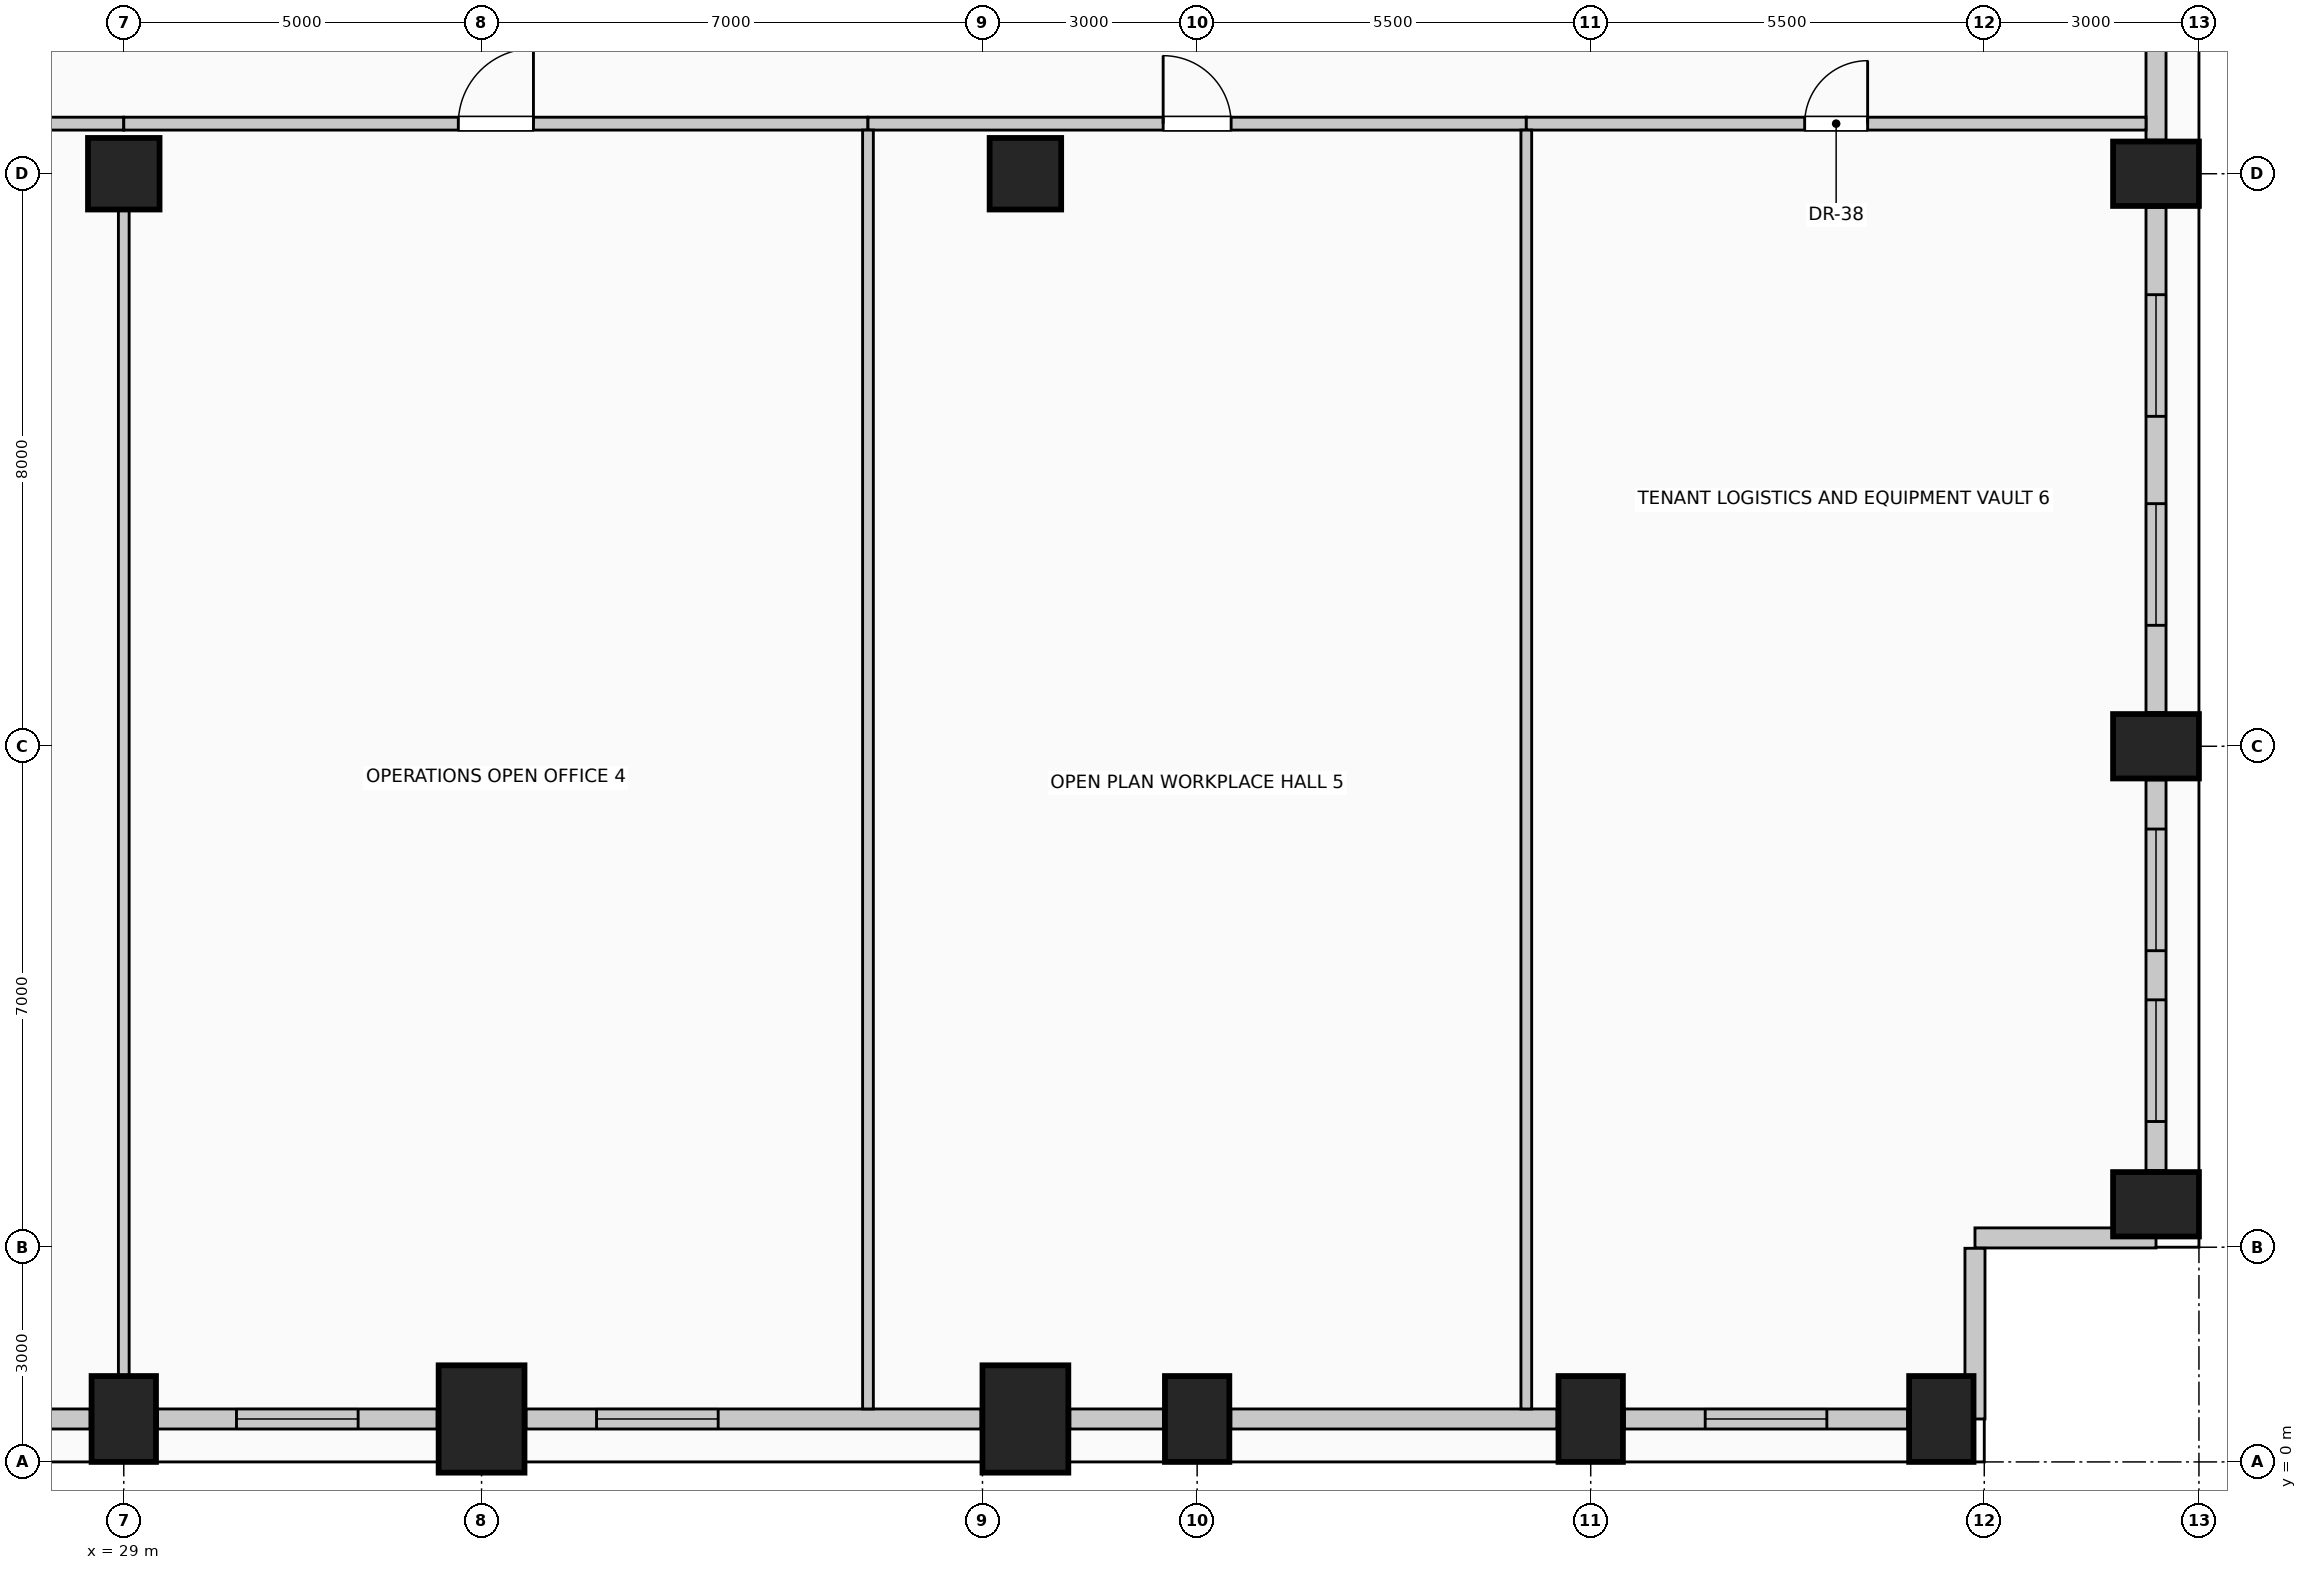
"""IFC4 building model, lengths in metres.
Left out: names, types, materials, properties, quantities, classifications, styles, units other than length and angle.
Written with IfcOpenShell. Run it as: python <this file> out.ifc"""

import sys

from ifc_helpers import new_model, si_unit, direction, frame, frame_2d, origin, origin_2d, place, context, subcontext, project, spatial, rectangle, circle, extrude, element, fill, save


model = new_model("IFC4")
c1 = context("Model", 3, precision=1e-05, world=origin(), true_north=direction((0.0, 1.0)))
c2 = subcontext(c1, "Body", "Model", "MODEL_VIEW")
j1 = project(units=[si_unit("LENGTHUNIT", "METRE"), si_unit("PLANEANGLEUNIT", "RADIAN")], contexts=[c1])
p1 = place(None, origin())
s1 = spatial("IfcSite", under=j1, at=p1, CompositionType="ELEMENT")
p2 = place(p1, origin())
s2 = spatial("IfcBuilding", under=s1, at=p2, CompositionType="ELEMENT")
p3 = place(p2, frame((0.0, 0.0, 78.6)))
s3 = spatial("IfcBuildingStorey", under=s2, at=p3, CompositionType="ELEMENT", Elevation=78.6)
p4 = place(p3, frame((29.0, 0.6, 0.0), z_axis=(0.0, 0.0, 1.0), x_axis=(1.0, 0.0, 0.0)))
e1 = element("IfcColumn", 1, at=p4, inside=s3, PredefinedType="COLUMN", context=c2, shape_type="SweptSolid", body=[
    extrude(rectangle(XDim=0.9, YDim=1.2, at=origin_2d()), origin(), (0.0, 0.0, 1.0), 4.0),
])
for number, where, z_axis, x_axis in (
    (2, (34.0, 0.6, 0.0), (0.0, 0.0, 1.0), (1.0, 0.0, 0.0)),
    (3, (41.6, 0.6, 0.0), (0.0, 0.0, 1.0), (1.0, 0.0, 0.0)),
):
    element("IfcColumn", number, at=place(p3, frame(where, z_axis=z_axis, x_axis=x_axis)), inside=s3, PredefinedType="COLUMN", context=c2, shape_type="SweptSolid", body=[
        extrude(rectangle(XDim=1.2, YDim=1.5, at=origin_2d()), origin(), (0.0, 0.0, 1.0), 4.0),
    ])
for number, where, z_axis, x_axis in (
    (4, (44.0, 0.6, 0.0), (0.0, 0.0, 1.0), (1.0, 0.0, 0.0)),
    (5, (49.5, 0.6, 0.0), (0.0, 0.0, 1.0), (1.0, 0.0, 0.0)),
    (6, (54.4, 0.6, 0.0), (0.0, 0.0, 1.0), (1.0, 0.0, 0.0)),
    (7, (57.4, 3.6, 0.0), (0.0, 0.0, 1.0), (0.0, 1.0, 0.0)),
    (8, (57.4, 10.0, 0.0), (0.0, 0.0, 1.0), (0.0, 1.0, 0.0)),
    (9, (57.4, 18.0, 0.0), (0.0, 0.0, 1.0), (0.0, 1.0, 0.0)),
):
    element("IfcColumn", number, at=place(p3, frame(where, z_axis=z_axis, x_axis=x_axis)), inside=s3, PredefinedType="COLUMN", context=c2, shape_type="SweptSolid", body=[
        extrude(rectangle(XDim=0.9, YDim=1.2, at=origin_2d()), origin(), (0.0, 0.0, 1.0), 4.0),
    ])
for number, where, z_axis, x_axis in (
    (10, (29.0, 18.0, 0.0), (0.0, 0.0, 1.0), (1.0, 0.0, 0.0)),
    (11, (41.6, 18.0, 0.0), (0.0, 0.0, 1.0), (1.0, 0.0, 0.0)),
):
    element("IfcColumn", number, at=place(p3, frame(where, z_axis=z_axis, x_axis=x_axis)), inside=s3, PredefinedType="COLUMN", context=c2, shape_type="SweptSolid", body=[
        extrude(circle(Radius=0.5, at=origin_2d()), origin(), (0.0, 0.0, 1.0), 4.0),
    ])
p5 = place(p3, frame((28.53, 0.6, 0.0), z_axis=(0.0, 0.0, 1.0), x_axis=(-1.0, 0.0, 0.0)))
e12 = element("IfcWall", 12, at=p5, inside=s3, PredefinedType="SOLIDWALL", context=c2, shape_type="SweptSolid", body=[
    extrude(rectangle(XDim=3.91, YDim=0.28, at=frame_2d((1.955, 0.0))), origin(), (0.0, 0.0, 1.0), 2.81),
])
p6 = place(p5, frame((1.105, 0.0, 0.5)))
e13 = element("IfcOpeningElement", 13, at=p6, cuts=e12, PredefinedType="OPENING", context=c2, shape_type="SweptSolid", body=[
    extrude(rectangle(XDim=1.7, YDim=1.95, at=frame_2d((0.85, 0.975))), frame((0.0, 0.15, 0.0), z_axis=(0.0, -1.0, 0.0), x_axis=(1.0, 0.0, 0.0)), (0.0, 0.0, 1.0), 0.3),
])
p7 = place(p3, frame((33.38, 0.6, 0.0), z_axis=(0.0, 0.0, 1.0), x_axis=(-1.0, 0.0, 0.0)))
e14 = element("IfcWall", 14, at=p7, inside=s3, PredefinedType="SOLIDWALL", context=c2, shape_type="SweptSolid", body=[
    extrude(rectangle(XDim=3.91, YDim=0.28, at=frame_2d((1.955, 0.0))), origin(), (0.0, 0.0, 1.0), 2.81),
])
p8 = place(p7, frame((1.105, 0.0, 0.5)))
e15 = element("IfcOpeningElement", 15, at=p8, cuts=e14, PredefinedType="OPENING", context=c2, shape_type="SweptSolid", body=[
    extrude(rectangle(XDim=1.7, YDim=1.95, at=frame_2d((0.85, 0.975))), frame((0.0, 0.15, 0.0), z_axis=(0.0, -1.0, 0.0), x_axis=(1.0, 0.0, 0.0)), (0.0, 0.0, 1.0), 0.3),
])
p9 = place(p3, frame((40.98, 0.6, 0.0), z_axis=(0.0, 0.0, 1.0), x_axis=(-1.0, 0.0, 0.0)))
e16 = element("IfcWall", 16, at=p9, inside=s3, PredefinedType="SOLIDWALL", context=c2, shape_type="SweptSolid", body=[
    extrude(rectangle(XDim=6.36, YDim=0.28, at=frame_2d((3.18, 0.0))), origin(), (0.0, 0.0, 1.0), 2.81),
])
p10 = place(p9, frame((3.673, 0.0, 0.5)))
e17 = element("IfcOpeningElement", 17, at=p10, cuts=e16, PredefinedType="OPENING", context=c2, shape_type="SweptSolid", body=[
    extrude(rectangle(XDim=1.7, YDim=1.95, at=frame_2d((0.85, 0.975))), frame((0.0, 0.15, 0.0), z_axis=(0.0, -1.0, 0.0), x_axis=(1.0, 0.0, 0.0)), (0.0, 0.0, 1.0), 0.3),
])
p11 = place(p3, frame((43.53, 0.6, 0.0), z_axis=(0.0, 0.0, 1.0), x_axis=(-1.0, 0.0, 0.0)))
e18 = element("IfcWall", 18, at=p11, inside=s3, PredefinedType="SOLIDWALL", context=c2, shape_type="SweptSolid", body=[
    extrude(rectangle(XDim=1.31, YDim=0.28, at=frame_2d((0.655, 0.0))), origin(), (0.0, 0.0, 1.0), 2.81),
])
p12 = place(p3, frame((49.03, 0.6, 0.0), z_axis=(0.0, 0.0, 1.0), x_axis=(-1.0, 0.0, 0.0)))
e19 = element("IfcWall", 19, at=p12, inside=s3, PredefinedType="SOLIDWALL", context=c2, shape_type="SweptSolid", body=[
    extrude(rectangle(XDim=4.56, YDim=0.28, at=frame_2d((2.28, 0.0))), origin(), (0.0, 0.0, 1.0), 2.81),
])
p13 = place(p3, frame((53.93, 0.6, 0.0), z_axis=(0.0, 0.0, 1.0), x_axis=(-1.0, 0.0, 0.0)))
e20 = element("IfcWall", 20, at=p13, inside=s3, PredefinedType="SOLIDWALL", context=c2, shape_type="SweptSolid", body=[
    extrude(rectangle(XDim=3.96, YDim=0.28, at=frame_2d((1.98, 0.0))), origin(), (0.0, 0.0, 1.0), 2.81),
])
p14 = place(p13, frame((1.13, 0.0, 0.5)))
e21 = element("IfcOpeningElement", 21, at=p14, cuts=e20, PredefinedType="OPENING", context=c2, shape_type="SweptSolid", body=[
    extrude(rectangle(XDim=1.7, YDim=1.95, at=frame_2d((0.85, 0.975))), frame((0.0, 0.15, 0.0), z_axis=(0.0, -1.0, 0.0), x_axis=(1.0, 0.0, 0.0)), (0.0, 0.0, 1.0), 0.3),
])
p15 = place(p3, frame((57.4, 9.53, 0.0), z_axis=(0.0, 0.0, 1.0), x_axis=(0.0, -1.0, 0.0)))
e22 = element("IfcWall", 22, at=p15, inside=s3, PredefinedType="SOLIDWALL", context=c2, shape_type="SweptSolid", body=[
    extrude(rectangle(XDim=5.46, YDim=0.28, at=frame_2d((2.73, 0.0))), origin(), (0.0, 0.0, 1.0), 2.81),
])
p16 = place(p15, frame((0.687, 0.0, 0.5)))
e23 = element("IfcOpeningElement", 23, at=p16, cuts=e22, PredefinedType="OPENING", context=c2, shape_type="SweptSolid", body=[
    extrude(rectangle(XDim=1.7, YDim=1.95, at=frame_2d((0.85, 0.975))), frame((0.0, 0.15, 0.0), z_axis=(0.0, -1.0, 0.0), x_axis=(1.0, 0.0, 0.0)), (0.0, 0.0, 1.0), 0.3),
])
p17 = place(p15, frame((3.073, 0.0, 0.5)))
e24 = element("IfcOpeningElement", 24, at=p17, cuts=e22, PredefinedType="OPENING", context=c2, shape_type="SweptSolid", body=[
    extrude(rectangle(XDim=1.7, YDim=1.95, at=frame_2d((0.85, 0.975))), frame((0.0, 0.15, 0.0), z_axis=(0.0, -1.0, 0.0), x_axis=(1.0, 0.0, 0.0)), (0.0, 0.0, 1.0), 0.3),
])
p18 = place(p3, frame((57.4, 17.53, 0.0), z_axis=(0.0, 0.0, 1.0), x_axis=(0.0, -1.0, 0.0)))
e25 = element("IfcWall", 25, at=p18, inside=s3, PredefinedType="SOLIDWALL", context=c2, shape_type="SweptSolid", body=[
    extrude(rectangle(XDim=7.06, YDim=0.28, at=frame_2d((3.53, 0.0))), origin(), (0.0, 0.0, 1.0), 2.81),
])
p19 = place(p18, frame((1.22, 0.0, 0.5)))
e26 = element("IfcOpeningElement", 26, at=p19, cuts=e25, PredefinedType="OPENING", context=c2, shape_type="SweptSolid", body=[
    extrude(rectangle(XDim=1.7, YDim=1.95, at=frame_2d((0.85, 0.975))), frame((0.0, 0.15, 0.0), z_axis=(0.0, -1.0, 0.0), x_axis=(1.0, 0.0, 0.0)), (0.0, 0.0, 1.0), 0.3),
])
p20 = place(p18, frame((4.14, 0.0, 0.5)))
e27 = element("IfcOpeningElement", 27, at=p20, cuts=e25, PredefinedType="OPENING", context=c2, shape_type="SweptSolid", body=[
    extrude(rectangle(XDim=1.7, YDim=1.95, at=frame_2d((0.85, 0.975))), frame((0.0, 0.15, 0.0), z_axis=(0.0, -1.0, 0.0), x_axis=(1.0, 0.0, 0.0)), (0.0, 0.0, 1.0), 0.3),
])
p21 = place(p3, frame((57.4, 25.53, 0.0), z_axis=(0.0, 0.0, 1.0), x_axis=(0.0, -1.0, 0.0)))
e28 = element("IfcWall", 28, at=p21, inside=s3, PredefinedType="SOLIDWALL", context=c2, shape_type="SweptSolid", body=[
    extrude(rectangle(XDim=7.06, YDim=0.28, at=frame_2d((3.53, 0.0))), origin(), (0.0, 0.0, 1.0), 2.81),
])
p22 = place(p3, frame((57.4, 3.13, 0.0), z_axis=(0.0, 0.0, 1.0), x_axis=(-1.0, 0.0, 0.0)))
e29 = element("IfcWall", 29, at=p22, inside=s3, PredefinedType="SOLIDWALL", context=c2, shape_type="SweptSolid", body=[
    extrude(rectangle(XDim=2.53, YDim=0.28, at=frame_2d((1.265, 0.0))), origin(), (0.0, 0.0, 1.0), 3.66),
])
p23 = place(p3, frame((54.87, 2.985, 0.0), z_axis=(0.0, 0.0, 1.0), x_axis=(0.0, -1.0, 0.0)))
e30 = element("IfcWall", 30, at=p23, inside=s3, PredefinedType="SOLIDWALL", context=c2, shape_type="SweptSolid", body=[
    extrude(rectangle(XDim=2.385, YDim=0.28, at=frame_2d((1.192, 0.0))), origin(), (0.0, 0.0, 1.0), 3.66),
])
p24 = place(p3, frame((19.2, 18.7, 0.0), z_axis=(0.0, 0.0, 1.0), x_axis=(1.0, 0.0, 0.0)))
e31 = element("IfcWall", 31, at=p24, inside=s3, PredefinedType="PARTITIONING", context=c2, shape_type="SweptSolid", body=[
    extrude(rectangle(XDim=9.8, YDim=0.18, at=frame_2d((4.9, 0.0))), origin(), (0.0, 0.0, 1.0), 3.66),
])
p25 = place(p24, frame((4.425, 0.0, 0.0)))
e32 = element("IfcOpeningElement", 32, at=p25, cuts=e31, PredefinedType="OPENING", context=c2, shape_type="SweptSolid", body=[
    extrude(rectangle(XDim=0.95, YDim=2.15, at=frame_2d((0.475, 1.075))), frame((0.0, 0.1, 0.0), z_axis=(0.0, -1.0, 0.0), x_axis=(1.0, 0.0, 0.0)), (0.0, 0.0, 1.0), 0.2),
])
p26 = place(p3, frame((29.0, 18.7, 0.0), z_axis=(0.0, 0.0, 1.0), x_axis=(1.0, 0.0, 0.0)))
e33 = element("IfcWall", 33, at=p26, inside=s3, PredefinedType="PARTITIONING", context=c2, shape_type="SweptSolid", body=[
    extrude(rectangle(XDim=10.4, YDim=0.18, at=frame_2d((5.2, 0.0))), origin(), (0.0, 0.0, 1.0), 3.66),
])
p27 = place(p26, frame((4.675, 0.0, 0.0)))
e34 = element("IfcOpeningElement", 34, at=p27, cuts=e33, PredefinedType="OPENING", context=c2, shape_type="SweptSolid", body=[
    extrude(rectangle(XDim=1.05, YDim=2.15, at=frame_2d((0.525, 1.075))), frame((0.0, 0.1, 0.0), z_axis=(0.0, -1.0, 0.0), x_axis=(1.0, 0.0, 0.0)), (0.0, 0.0, 1.0), 0.2),
])
p28 = place(p3, frame((39.4, 18.7, 0.0), z_axis=(0.0, 0.0, 1.0), x_axis=(1.0, 0.0, 0.0)))
e35 = element("IfcWall", 35, at=p28, inside=s3, PredefinedType="PARTITIONING", context=c2, shape_type="SweptSolid", body=[
    extrude(rectangle(XDim=9.2, YDim=0.18, at=frame_2d((4.6, 0.0))), origin(), (0.0, 0.0, 1.0), 3.66),
])
p29 = place(p28, frame((4.125, 0.0, 0.0)))
e36 = element("IfcOpeningElement", 36, at=p29, cuts=e35, PredefinedType="OPENING", context=c2, shape_type="SweptSolid", body=[
    extrude(rectangle(XDim=0.95, YDim=2.15, at=frame_2d((0.475, 1.075))), frame((0.0, 0.1, 0.0), z_axis=(0.0, -1.0, 0.0), x_axis=(1.0, 0.0, 0.0)), (0.0, 0.0, 1.0), 0.2),
])
p30 = place(p3, frame((48.6, 18.7, 0.0), z_axis=(0.0, 0.0, 1.0), x_axis=(1.0, 0.0, 0.0)))
e37 = element("IfcWall", 37, at=p30, inside=s3, PredefinedType="PARTITIONING", context=c2, shape_type="SweptSolid", body=[
    extrude(rectangle(XDim=8.66, YDim=0.18, at=frame_2d((4.33, 0.0))), origin(), (0.0, 0.0, 1.0), 3.66),
])
p31 = place(p30, frame((3.89, 0.0, 0.0)))
e38 = element("IfcOpeningElement", 38, at=p31, cuts=e37, PredefinedType="OPENING", context=c2, shape_type="SweptSolid", body=[
    extrude(rectangle(XDim=0.88, YDim=2.1, at=frame_2d((0.44, 1.05))), frame((0.0, 0.1, 0.0), z_axis=(0.0, -1.0, 0.0), x_axis=(1.0, 0.0, 0.0)), (0.0, 0.0, 1.0), 0.2),
])
p32 = place(p3, frame((29.0, 1.2, 0.0), z_axis=(0.0, 0.0, 1.0), x_axis=(0.0, 1.0, 0.0)))
e39 = element("IfcWall", 39, at=p32, inside=s3, PredefinedType="PARTITIONING", context=c2, shape_type="SweptSolid", body=[
    extrude(rectangle(XDim=16.3, YDim=0.15, at=frame_2d((8.15, 0.0))), origin(), (0.0, 0.0, 1.0), 2.955),
])
for number, where, z_axis, x_axis in (
    (40, (39.4, 0.74, 0.0), (0.0, 0.0, 1.0), (0.0, 1.0, 0.0)),
    (41, (48.6, 0.74, 0.0), (0.0, 0.0, 1.0), (0.0, 1.0, 0.0)),
):
    element("IfcWall", number, at=place(p3, frame(where, z_axis=z_axis, x_axis=x_axis)), inside=s3, PredefinedType="PARTITIONING", context=c2, shape_type="SweptSolid", body=[
        extrude(rectangle(XDim=17.87, YDim=0.15, at=frame_2d((8.935, 0.0))), origin(), (0.0, 0.0, 1.0), 3.66),
    ])
p33 = place(p8, origin())
e42 = element("IfcWindow", 42, at=p33, inside=s3, PartitioningType="SINGLE_PANEL", PredefinedType="WINDOW", context=c2, shape_type="SweptSolid", body=[
    extrude(rectangle(XDim=1.7, YDim=1.95, at=frame_2d((0.85, 0.975))), frame((0.0, 0.03, 0.0), z_axis=(0.0, -1.0, 0.0), x_axis=(1.0, 0.0, 0.0)), (0.0, 0.0, 1.0), 0.06),
])
fill(e15, e42)
p34 = place(p10, origin())
e43 = element("IfcWindow", 43, at=p34, inside=s3, PartitioningType="SINGLE_PANEL", PredefinedType="WINDOW", context=c2, shape_type="SweptSolid", body=[
    extrude(rectangle(XDim=1.7, YDim=1.95, at=frame_2d((0.85, 0.975))), frame((0.0, 0.03, 0.0), z_axis=(0.0, -1.0, 0.0), x_axis=(1.0, 0.0, 0.0)), (0.0, 0.0, 1.0), 0.06),
])
fill(e17, e43)
p35 = place(p14, origin())
e44 = element("IfcWindow", 44, at=p35, inside=s3, PartitioningType="SINGLE_PANEL", PredefinedType="WINDOW", context=c2, shape_type="SweptSolid", body=[
    extrude(rectangle(XDim=1.7, YDim=1.95, at=frame_2d((0.85, 0.975))), frame((0.0, 0.03, 0.0), z_axis=(0.0, -1.0, 0.0), x_axis=(1.0, 0.0, 0.0)), (0.0, 0.0, 1.0), 0.06),
])
fill(e21, e44)
p36 = place(p16, origin())
e45 = element("IfcWindow", 45, at=p36, inside=s3, PartitioningType="SINGLE_PANEL", PredefinedType="WINDOW", context=c2, shape_type="SweptSolid", body=[
    extrude(rectangle(XDim=1.7, YDim=1.95, at=frame_2d((0.85, 0.975))), frame((0.0, 0.03, 0.0), z_axis=(0.0, -1.0, 0.0), x_axis=(1.0, 0.0, 0.0)), (0.0, 0.0, 1.0), 0.06),
])
fill(e23, e45)
p37 = place(p17, origin())
e46 = element("IfcWindow", 46, at=p37, inside=s3, PartitioningType="SINGLE_PANEL", PredefinedType="WINDOW", context=c2, shape_type="SweptSolid", body=[
    extrude(rectangle(XDim=1.7, YDim=1.95, at=frame_2d((0.85, 0.975))), frame((0.0, 0.03, 0.0), z_axis=(0.0, -1.0, 0.0), x_axis=(1.0, 0.0, 0.0)), (0.0, 0.0, 1.0), 0.06),
])
fill(e24, e46)
p38 = place(p19, origin())
e47 = element("IfcWindow", 47, at=p38, inside=s3, PartitioningType="SINGLE_PANEL", PredefinedType="WINDOW", context=c2, shape_type="SweptSolid", body=[
    extrude(rectangle(XDim=1.7, YDim=1.95, at=frame_2d((0.85, 0.975))), frame((0.0, 0.03, 0.0), z_axis=(0.0, -1.0, 0.0), x_axis=(1.0, 0.0, 0.0)), (0.0, 0.0, 1.0), 0.06),
])
fill(e26, e47)
p39 = place(p20, origin())
e48 = element("IfcWindow", 48, at=p39, inside=s3, PartitioningType="SINGLE_PANEL", PredefinedType="WINDOW", context=c2, shape_type="SweptSolid", body=[
    extrude(rectangle(XDim=1.7, YDim=1.95, at=frame_2d((0.85, 0.975))), frame((0.0, 0.03, 0.0), z_axis=(0.0, -1.0, 0.0), x_axis=(1.0, 0.0, 0.0)), (0.0, 0.0, 1.0), 0.06),
])
fill(e27, e48)
p40 = place(p27, origin())
e49 = element("IfcDoor", 49, at=p40, inside=s3, OperationType="SINGLE_SWING_RIGHT", PredefinedType="DOOR", context=c2, shape_type="SweptSolid", body=[
    extrude(rectangle(XDim=1.05, YDim=2.15, at=frame_2d((0.525, 1.075))), frame((0.0, 0.025, 0.0), z_axis=(0.0, -1.0, 0.0), x_axis=(1.0, 0.0, 0.0)), (0.0, 0.0, 1.0), 0.05),
])
fill(e34, e49)
p41 = place(p29, origin())
e50 = element("IfcDoor", 50, at=p41, inside=s3, OperationType="SINGLE_SWING_LEFT", PredefinedType="DOOR", context=c2, shape_type="SweptSolid", body=[
    extrude(rectangle(XDim=0.95, YDim=2.15, at=frame_2d((0.475, 1.075))), frame((0.0, 0.025, 0.0), z_axis=(0.0, -1.0, 0.0), x_axis=(1.0, 0.0, 0.0)), (0.0, 0.0, 1.0), 0.05),
])
fill(e36, e50)
p42 = place(p31, origin())
e51 = element("IfcDoor", 51, at=p42, inside=s3, OperationType="SINGLE_SWING_RIGHT", PredefinedType="DOOR", context=c2, shape_type="SweptSolid", body=[
    extrude(rectangle(XDim=0.88, YDim=2.1, at=frame_2d((0.44, 1.05))), frame((0.0, 0.025, 0.0), z_axis=(0.0, -1.0, 0.0), x_axis=(1.0, 0.0, 0.0)), (0.0, 0.0, 1.0), 0.05),
])
fill(e38, e51)
save(model, sys.argv[1])
